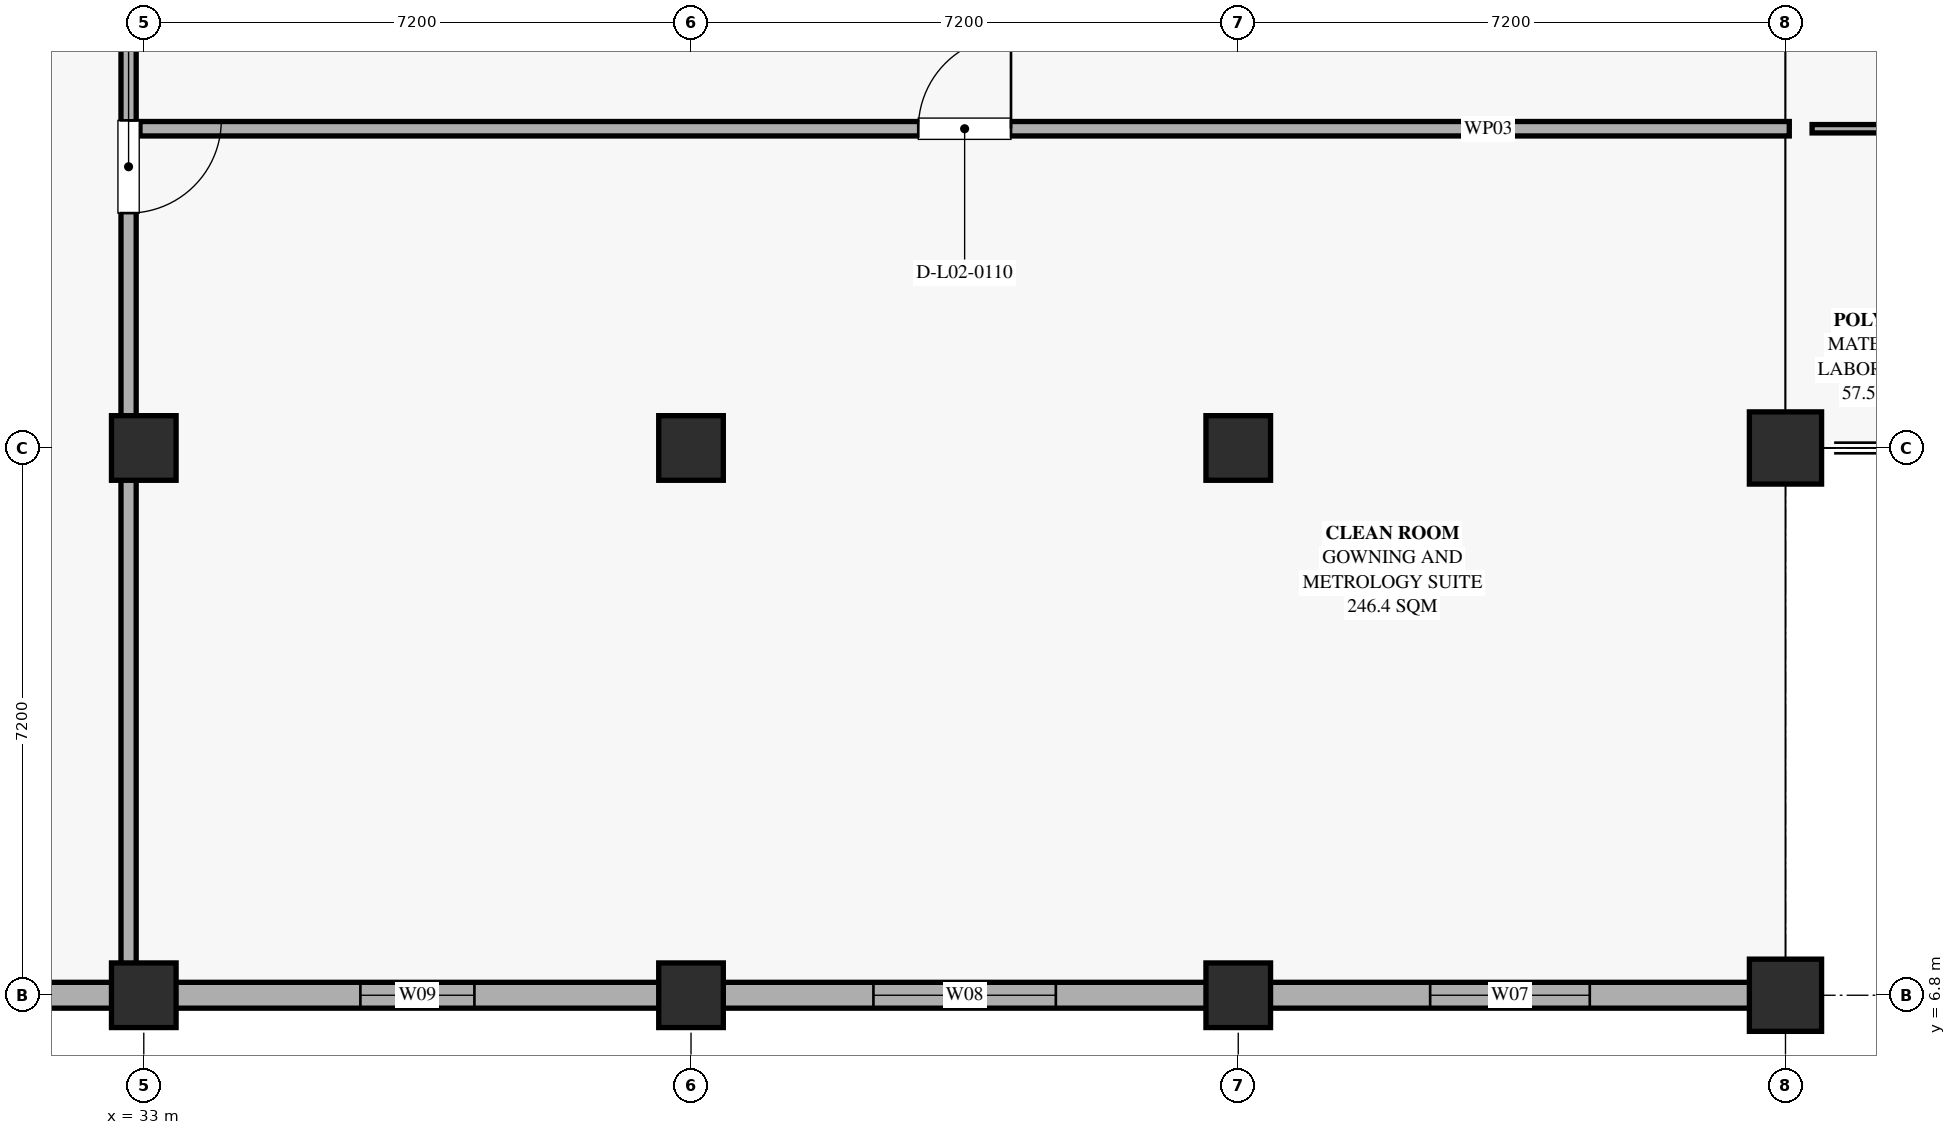
"""IFC4 building model, lengths in metres.
Left out: names, types, materials, properties, quantities, classifications, styles, units other than length and angle.
Written with IfcOpenShell. Run it as: python <this file> out.ifc"""

import sys

from ifc_helpers import new_model, si_unit, direction, frame, frame_2d, origin, origin_2d, place, context, subcontext, project, spatial, rectangle, extrude, element, fill, save


model = new_model("IFC4")
c1 = context("Model", 3, precision=1e-05, world=origin(), true_north=direction((0.0, 1.0)))
c2 = subcontext(c1, "Body", "Model", "MODEL_VIEW")
j1 = project(units=[si_unit("LENGTHUNIT", "METRE"), si_unit("PLANEANGLEUNIT", "RADIAN")], contexts=[c1])
p1 = place(None, origin())
s1 = spatial("IfcSite", under=j1, at=p1, CompositionType="ELEMENT")
p2 = place(p1, origin())
s2 = spatial("IfcBuilding", under=s1, at=p2, CompositionType="ELEMENT")
p3 = place(p2, frame((0.0, 0.0, 10.44)))
s3 = spatial("IfcBuildingStorey", under=s2, at=p3, CompositionType="ELEMENT", Elevation=10.44)
for number, where, z_axis, x_axis in (
    (1, (33.0, 6.8, 0.0), (0.0, 0.0, 1.0), (1.0, 0.0, 0.0)),
    (2, (40.2, 6.8, 0.0), (0.0, 0.0, 1.0), (1.0, 0.0, 0.0)),
    (3, (47.4, 6.8, 0.0), (0.0, 0.0, 1.0), (1.0, 0.0, 0.0)),
):
    element("IfcColumn", number, at=place(p3, frame(where, z_axis=z_axis, x_axis=x_axis)), inside=s3, PredefinedType="COLUMN", context=c2, shape_type="SweptSolid", body=[
        extrude(rectangle(XDim=0.85, YDim=0.85, at=origin_2d()), origin(), (0.0, 0.0, 1.0), 4.68),
    ])
p4 = place(p3, frame((54.6, 6.8, 0.0), z_axis=(0.0, 0.0, 1.0), x_axis=(1.0, 0.0, 0.0)))
e4 = element("IfcColumn", 4, at=p4, inside=s3, PredefinedType="COLUMN", context=c2, shape_type="SweptSolid", body=[
    extrude(rectangle(XDim=0.95, YDim=0.95, at=origin_2d()), origin(), (0.0, 0.0, 1.0), 4.68),
])
for number, where, z_axis, x_axis in (
    (5, (33.0, 14.0, 0.0), (0.0, 0.0, 1.0), (1.0, 0.0, 0.0)),
    (6, (40.2, 14.0, 0.0), (0.0, 0.0, 1.0), (1.0, 0.0, 0.0)),
    (7, (47.4, 14.0, 0.0), (0.0, 0.0, 1.0), (1.0, 0.0, 0.0)),
):
    element("IfcColumn", number, at=place(p3, frame(where, z_axis=z_axis, x_axis=x_axis)), inside=s3, PredefinedType="COLUMN", context=c2, shape_type="SweptSolid", body=[
        extrude(rectangle(XDim=0.85, YDim=0.85, at=origin_2d()), origin(), (0.0, 0.0, 1.0), 4.68),
    ])
p5 = place(p3, frame((54.6, 14.0, 0.0), z_axis=(0.0, 0.0, 1.0), x_axis=(1.0, 0.0, 0.0)))
e8 = element("IfcColumn", 8, at=p5, inside=s3, PredefinedType="COLUMN", context=c2, shape_type="SweptSolid", body=[
    extrude(rectangle(XDim=0.95, YDim=0.95, at=origin_2d()), origin(), (0.0, 0.0, 1.0), 4.68),
])
p6 = place(p3, frame((54.14, 6.8, 0.0), z_axis=(0.0, 0.0, 1.0), x_axis=(-1.0, 0.0, 0.0)))
e9 = element("IfcWall", 9, at=p6, inside=s3, PredefinedType="SOLIDWALL", context=c2, shape_type="SweptSolid", body=[
    extrude(rectangle(XDim=6.33, YDim=0.34, at=frame_2d((3.165, 0.0))), origin(), (0.0, 0.0, 1.0), 3.18),
])
p7 = place(p6, frame((2.115, 0.0, 0.85)))
e10 = element("IfcOpeningElement", 10, at=p7, cuts=e9, PredefinedType="OPENING", context=c2, shape_type="SweptSolid", body=[
    extrude(rectangle(XDim=2.1, YDim=2.1, at=frame_2d((1.05, 1.05))), frame((0.0, 0.18, 0.0), z_axis=(0.0, -1.0, 0.0), x_axis=(1.0, 0.0, 0.0)), (0.0, 0.0, 1.0), 0.36),
])
p8 = place(p3, frame((46.99, 6.8, 0.0), z_axis=(0.0, 0.0, 1.0), x_axis=(-1.0, 0.0, 0.0)))
e11 = element("IfcWall", 11, at=p8, inside=s3, PredefinedType="SOLIDWALL", context=c2, shape_type="SweptSolid", body=[
    extrude(rectangle(XDim=6.38, YDim=0.34, at=frame_2d((3.19, 0.0))), origin(), (0.0, 0.0, 1.0), 3.18),
])
p9 = place(p8, frame((1.99, 0.0, 0.85)))
e12 = element("IfcOpeningElement", 12, at=p9, cuts=e11, PredefinedType="OPENING", context=c2, shape_type="SweptSolid", body=[
    extrude(rectangle(XDim=2.4, YDim=2.1, at=frame_2d((1.2, 1.05))), frame((0.0, 0.18, 0.0), z_axis=(0.0, -1.0, 0.0), x_axis=(1.0, 0.0, 0.0)), (0.0, 0.0, 1.0), 0.36),
])
p10 = place(p3, frame((39.79, 6.8, 0.0), z_axis=(0.0, 0.0, 1.0), x_axis=(-1.0, 0.0, 0.0)))
e13 = element("IfcWall", 13, at=p10, inside=s3, PredefinedType="SOLIDWALL", context=c2, shape_type="SweptSolid", body=[
    extrude(rectangle(XDim=6.38, YDim=0.34, at=frame_2d((3.19, 0.0))), origin(), (0.0, 0.0, 1.0), 3.18),
])
p11 = place(p10, frame((2.44, 0.0, 0.85)))
e14 = element("IfcOpeningElement", 14, at=p11, cuts=e13, PredefinedType="OPENING", context=c2, shape_type="SweptSolid", body=[
    extrude(rectangle(XDim=1.5, YDim=2.1, at=frame_2d((0.75, 1.05))), frame((0.0, 0.18, 0.0), z_axis=(0.0, -1.0, 0.0), x_axis=(1.0, 0.0, 0.0)), (0.0, 0.0, 1.0), 0.36),
])
p12 = place(p3, frame((32.59, 6.8, 0.0), z_axis=(0.0, 0.0, 1.0), x_axis=(-1.0, 0.0, 0.0)))
e15 = element("IfcWall", 15, at=p12, inside=s3, PredefinedType="SOLIDWALL", context=c2, shape_type="SweptSolid", body=[
    extrude(rectangle(XDim=6.38, YDim=0.34, at=frame_2d((3.19, 0.0))), origin(), (0.0, 0.0, 1.0), 3.18),
])
p13 = place(p12, frame((2.59, 0.0, 0.85)))
e16 = element("IfcOpeningElement", 16, at=p13, cuts=e15, PredefinedType="OPENING", context=c2, shape_type="SweptSolid", body=[
    extrude(rectangle(XDim=1.2, YDim=2.1, at=frame_2d((0.6, 1.05))), frame((0.0, 0.18, 0.0), z_axis=(0.0, -1.0, 0.0), x_axis=(1.0, 0.0, 0.0)), (0.0, 0.0, 1.0), 0.36),
])
p14 = place(p3, frame((54.95, 18.2, 0.0), z_axis=(0.0, 0.0, 1.0), x_axis=(1.0, 0.0, 0.0)))
e17 = element("IfcWall", 17, at=p14, inside=s3, PredefinedType="PARTITIONING", context=c2, shape_type="SweptSolid", body=[
    extrude(rectangle(XDim=13.9, YDim=0.11, at=frame_2d((6.95, 0.0))), origin(), (0.0, 0.0, 1.0), 3.16),
])
p15 = place(p14, frame((2.615, 0.0, 0.0)))
e18 = element("IfcOpeningElement", 18, at=p15, cuts=e17, PredefinedType="OPENING", context=c2, shape_type="SweptSolid", body=[
    extrude(rectangle(XDim=1.27, YDim=2.16, at=frame_2d((0.635, 1.08))), frame((0.0, 0.065, 0.0), z_axis=(0.0, -1.0, 0.0), x_axis=(1.0, 0.0, 0.0)), (0.0, 0.0, 1.0), 0.13),
])
p16 = place(p3, frame((32.8, 28.25, 0.0), z_axis=(0.0, 0.0, 1.0), x_axis=(0.0, -1.0, 0.0)))
e19 = element("IfcWall", 19, at=p16, inside=s3, PredefinedType="PARTITIONING", context=c2, shape_type="SweptSolid", body=[
    extrude(rectangle(XDim=21.1, YDim=0.2, at=frame_2d((10.55, 0.0))), origin(), (0.0, 0.0, 1.0), 3.16),
])
p17 = place(p16, frame((9.94, 0.0, 0.0)))
e20 = element("IfcOpeningElement", 20, at=p17, cuts=e19, PredefinedType="OPENING", context=c2, shape_type="SweptSolid", body=[
    extrude(rectangle(XDim=1.22, YDim=2.06, at=frame_2d((0.61, 1.03))), frame((0.0, 0.11, 0.0), z_axis=(0.0, -1.0, 0.0), x_axis=(1.0, 0.0, 0.0)), (0.0, 0.0, 1.0), 0.22),
])
p18 = place(p3, frame((32.95, 18.2, 0.0), z_axis=(0.0, 0.0, 1.0), x_axis=(1.0, 0.0, 0.0)))
e21 = element("IfcWall", 21, at=p18, inside=s3, PredefinedType="PARTITIONING", context=c2, shape_type="SweptSolid", body=[
    extrude(rectangle(XDim=21.7, YDim=0.19, at=frame_2d((10.85, 0.0))), origin(), (0.0, 0.0, 1.0), 3.16),
])
p19 = place(p18, frame((10.24, 0.0, 0.0)))
e22 = element("IfcOpeningElement", 22, at=p19, cuts=e21, PredefinedType="OPENING", context=c2, shape_type="SweptSolid", body=[
    extrude(rectangle(XDim=1.22, YDim=2.12, at=frame_2d((0.61, 1.06))), frame((0.0, 0.105, 0.0), z_axis=(0.0, -1.0, 0.0), x_axis=(1.0, 0.0, 0.0)), (0.0, 0.0, 1.0), 0.21),
])
p20 = place(p7, origin())
e23 = element("IfcWindow", 23, at=p20, inside=s3, PartitioningType="DOUBLE_PANEL_VERTICAL", PredefinedType="WINDOW", context=c2, shape_type="SweptSolid", body=[
    extrude(rectangle(XDim=2.1, YDim=2.1, at=frame_2d((1.05, 1.05))), frame((0.0, 0.03, 0.0), z_axis=(0.0, -1.0, 0.0), x_axis=(1.0, 0.0, 0.0)), (0.0, 0.0, 1.0), 0.06),
])
fill(e10, e23)
p21 = place(p9, origin())
e24 = element("IfcWindow", 24, at=p21, inside=s3, PartitioningType="DOUBLE_PANEL_VERTICAL", PredefinedType="WINDOW", context=c2, shape_type="SweptSolid", body=[
    extrude(rectangle(XDim=2.4, YDim=2.1, at=frame_2d((1.2, 1.05))), frame((0.0, 0.03, 0.0), z_axis=(0.0, -1.0, 0.0), x_axis=(1.0, 0.0, 0.0)), (0.0, 0.0, 1.0), 0.06),
])
fill(e12, e24)
p22 = place(p11, origin())
e25 = element("IfcWindow", 25, at=p22, inside=s3, PartitioningType="SINGLE_PANEL", PredefinedType="WINDOW", context=c2, shape_type="SweptSolid", body=[
    extrude(rectangle(XDim=1.5, YDim=2.1, at=frame_2d((0.75, 1.05))), frame((0.0, 0.03, 0.0), z_axis=(0.0, -1.0, 0.0), x_axis=(1.0, 0.0, 0.0)), (0.0, 0.0, 1.0), 0.06),
])
fill(e14, e25)
p23 = place(p17, origin())
e26 = element("IfcDoor", 26, at=p23, inside=s3, OperationType="SINGLE_SWING_LEFT", PredefinedType="DOOR", context=c2, shape_type="SweptSolid", body=[
    extrude(rectangle(XDim=1.22, YDim=2.06, at=frame_2d((0.61, 1.03))), frame((0.0, 0.025, 0.0), z_axis=(0.0, -1.0, 0.0), x_axis=(1.0, 0.0, 0.0)), (0.0, 0.0, 1.0), 0.05),
])
fill(e20, e26)
p24 = place(p19, origin())
e27 = element("IfcDoor", 27, at=p24, inside=s3, OperationType="SINGLE_SWING_RIGHT", PredefinedType="DOOR", context=c2, shape_type="SweptSolid", body=[
    extrude(rectangle(XDim=1.22, YDim=2.12, at=frame_2d((0.61, 1.06))), frame((0.0, 0.025, 0.0), z_axis=(0.0, -1.0, 0.0), x_axis=(1.0, 0.0, 0.0)), (0.0, 0.0, 1.0), 0.05),
])
fill(e22, e27)
save(model, sys.argv[1])
